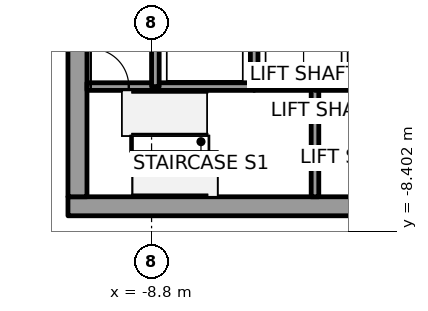
"""IFC4 building model, lengths in metres.
Left out: names, types, materials, properties, quantities, classifications, styles, units other than length and angle.
Written with IfcOpenShell. Run it as: python <this file> out.ifc"""

import sys

from ifc_helpers import new_model, si_unit, direction, frame, frame_2d, origin, place, context, subcontext, project, spatial, rectangle, extrude, element, fill, save


model = new_model("IFC4")
c1 = context("Model", 3, precision=1e-05, world=origin(), true_north=direction((0.0, 1.0)))
c2 = subcontext(c1, "Body", "Model", "MODEL_VIEW")
j1 = project(units=[si_unit("LENGTHUNIT", "METRE"), si_unit("PLANEANGLEUNIT", "RADIAN")], contexts=[c1])
p1 = place(None, origin())
s1 = spatial("IfcSite", under=j1, at=p1, CompositionType="ELEMENT")
p2 = place(p1, origin())
s2 = spatial("IfcBuilding", under=s1, at=p2, CompositionType="ELEMENT")
p3 = place(p2, frame((0.0, 0.0, 107.2)))
s3 = spatial("IfcBuildingStorey", under=s2, at=p3, CompositionType="ELEMENT", Elevation=107.2)
p4 = place(p3, frame((-11.0, -7.75, 0.0), z_axis=(0.0, 0.0, 1.0), x_axis=(1.0, 0.0, 0.0)))
e1 = element("IfcWall", 1, at=p4, inside=s3, PredefinedType="SHEAR", context=c2, shape_type="SweptSolid", body=[
    extrude(rectangle(XDim=22.0, YDim=0.5, at=frame_2d((11.0, 0.0))), origin(), (0.0, 0.0, 1.0), 5.4),
])
p5 = place(p4, frame((10.45, 0.0, 0.0)))
e2 = element("IfcOpeningElement", 2, at=p5, cuts=e1, PredefinedType="OPENING", context=c2, shape_type="SweptSolid", body=[
    extrude(rectangle(XDim=1.1, YDim=2.1, at=frame_2d((0.55, 1.05))), frame((0.0, 0.25, 0.0), z_axis=(0.0, -1.0, 0.0), x_axis=(1.0, 0.0, 0.0)), (0.0, 0.0, 1.0), 0.5),
])
p6 = place(p3, frame((-10.75, -7.5, 0.0), z_axis=(0.0, 0.0, 1.0), x_axis=(0.0, 1.0, 0.0)))
e3 = element("IfcWall", 3, at=p6, inside=s3, PredefinedType="SHEAR", context=c2, shape_type="SweptSolid", body=[
    extrude(rectangle(XDim=15.0, YDim=0.5, at=frame_2d((7.5, 0.0))), origin(), (0.0, 0.0, 1.0), 5.4),
])
p7 = place(p6, frame((6.6, 0.0, 0.0)))
e4 = element("IfcOpeningElement", 4, at=p7, cuts=e3, PredefinedType="OPENING", context=c2, shape_type="SweptSolid", body=[
    extrude(rectangle(XDim=1.8, YDim=2.1, at=frame_2d((0.9, 1.05))), frame((0.0, 0.25, 0.0), z_axis=(0.0, -1.0, 0.0), x_axis=(1.0, 0.0, 0.0)), (0.0, 0.0, 1.0), 0.5),
])
p8 = place(p3, frame((-10.5, -4.6, 0.0), z_axis=(0.0, 0.0, 1.0), x_axis=(1.0, 0.0, 0.0)))
e5 = element("IfcWall", 5, at=p8, inside=s3, PredefinedType="SOLIDWALL", context=c2, shape_type="SweptSolid", body=[
    extrude(rectangle(XDim=1.8, YDim=0.2, at=frame_2d((0.9, 0.0))), origin(), (0.0, 0.0, 1.0), 5.25),
])
p9 = place(p8, frame((0.1, 0.0, 0.0)))
e6 = element("IfcOpeningElement", 6, at=p9, cuts=e5, PredefinedType="OPENING", context=c2, shape_type="SweptSolid", body=[
    extrude(rectangle(XDim=1.0, YDim=2.1, at=frame_2d((0.5, 1.05))), frame((0.0, 0.1, 0.0), z_axis=(0.0, -1.0, 0.0), x_axis=(1.0, 0.0, 0.0)), (0.0, 0.0, 1.0), 0.2),
])
p10 = place(p3, frame((-8.7, -4.6, 0.0), z_axis=(0.0, 0.0, 1.0), x_axis=(1.0, 0.0, 0.0)))
e7 = element("IfcWall", 7, at=p10, inside=s3, PredefinedType="SOLIDWALL", context=c2, shape_type="SweptSolid", body=[
    extrude(rectangle(XDim=2.6, YDim=0.2, at=frame_2d((1.3, 0.0))), origin(), (0.0, 0.0, 1.0), 5.25),
])
p11 = place(p3, frame((-8.7, -4.6, 0.0), z_axis=(0.0, 0.0, 1.0), x_axis=(0.0, 1.0, 0.0)))
e8 = element("IfcWall", 8, at=p11, inside=s3, PredefinedType="SOLIDWALL", context=c2, shape_type="SweptSolid", body=[
    extrude(rectangle(XDim=2.8, YDim=0.2, at=frame_2d((1.4, 0.0))), origin(), (0.0, 0.0, 1.0), 5.25),
])
p12 = place(p3, frame((-6.1, -4.6, 0.0), z_axis=(0.0, 0.0, 1.0), x_axis=(1.0, 0.0, 0.0)))
e9 = element("IfcWall", 9, at=p12, inside=s3, PredefinedType="SOLIDWALL", context=c2, shape_type="SweptSolid", body=[
    extrude(rectangle(XDim=1.6, YDim=0.2, at=frame_2d((0.8, 0.0))), origin(), (0.0, 0.0, 1.0), 5.25),
])
p13 = place(p3, frame((-6.1, -4.6, 0.0), z_axis=(0.0, 0.0, 1.0), x_axis=(0.0, 1.0, 0.0)))
e10 = element("IfcWall", 10, at=p13, inside=s3, PredefinedType="SOLIDWALL", context=c2, shape_type="SweptSolid", body=[
    extrude(rectangle(XDim=2.8, YDim=0.2, at=frame_2d((1.4, 0.0))), origin(), (0.0, 0.0, 1.0), 5.25),
])
p14 = place(p3, frame((-4.5, -4.6, 0.0), z_axis=(0.0, 0.0, 1.0), x_axis=(0.0, -1.0, 0.0)))
e11 = element("IfcWall", 11, at=p14, inside=s3, PredefinedType="SOLIDWALL", context=c2, shape_type="SweptSolid", body=[
    extrude(rectangle(XDim=2.9, YDim=0.2, at=frame_2d((1.45, 0.0))), origin(), (0.0, 0.0, 1.0), 5.25),
])
p15 = place(p3, frame((-4.5, -4.6, 0.0), z_axis=(0.0, 0.0, 1.0), x_axis=(1.0, 0.0, 0.0)))
e12 = element("IfcWall", 12, at=p15, inside=s3, PredefinedType="SOLIDWALL", context=c2, shape_type="SweptSolid", body=[
    extrude(rectangle(XDim=1.0, YDim=0.2, at=frame_2d((0.5, 0.0))), origin(), (0.0, 0.0, 1.0), 5.25),
])
p16 = place(p9, origin())
e13 = element("IfcDoor", 13, at=p16, inside=s3, OperationType="SINGLE_SWING_LEFT", PredefinedType="DOOR", context=c2, shape_type="SweptSolid", body=[
    extrude(rectangle(XDim=1.0, YDim=2.1, at=frame_2d((0.5, 1.05))), frame((0.0, 0.025, 0.0), z_axis=(0.0, -1.0, 0.0), x_axis=(1.0, 0.0, 0.0)), (0.0, 0.0, 1.0), 0.05),
])
fill(e6, e13)
save(model, sys.argv[1])
